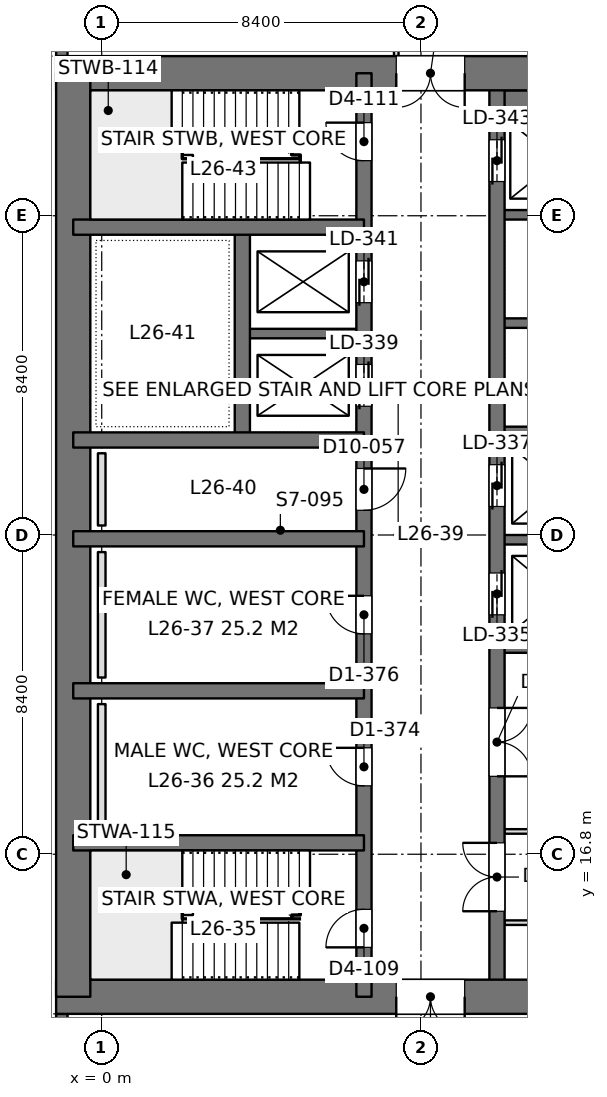
"""IFC4 building model, lengths in metres.
Left out: names, types, materials, properties, quantities, classifications, styles, units other than length and angle.
Written with IfcOpenShell. Run it as: python <this file> out.ifc"""

import sys

from ifc_helpers import new_model, si_unit, direction, frame, frame_2d, origin, place, context, subcontext, project, spatial, rectangle, extrude, element, fill, save


model = new_model("IFC4")
c1 = context("Model", 3, precision=1e-05, world=origin(), true_north=direction((0.0, 1.0)))
c2 = subcontext(c1, "Body", "Model", "MODEL_VIEW")
j1 = project(units=[si_unit("LENGTHUNIT", "METRE"), si_unit("PLANEANGLEUNIT", "RADIAN")], contexts=[c1])
p1 = place(None, origin())
s1 = spatial("IfcSite", under=j1, at=p1, CompositionType="ELEMENT")
p2 = place(p1, origin())
s2 = spatial("IfcBuilding", under=s1, at=p2, CompositionType="ELEMENT")
p3 = place(p2, frame((0.0, 0.0, 117.6)))
s3 = spatial("IfcBuildingStorey", under=s2, at=p3, CompositionType="ELEMENT", Elevation=117.6)
p4 = place(p3, frame((-1.2, 13.05, 0.0), z_axis=(0.0, 0.0, 1.0), x_axis=(1.0, 0.0, 0.0)))
e1 = element("IfcWall", 1, at=p4, inside=s3, PredefinedType="SHEAR", context=c2, shape_type="SweptSolid", body=[
    extrude(rectangle(XDim=18.0, YDim=0.9, at=frame_2d((9.0, 0.0))), origin(), (0.0, 0.0, 1.0), 4.2),
])
p5 = place(p4, frame((8.95, 0.0, 0.0)))
e2 = element("IfcOpeningElement", 2, at=p5, cuts=e1, PredefinedType="OPENING", context=c2, shape_type="SweptSolid", body=[
    extrude(rectangle(XDim=1.8, YDim=2.4, at=frame_2d((0.9, 1.2))), frame((0.0, 0.46, 0.0), z_axis=(0.0, -1.0, 0.0), x_axis=(1.0, 0.0, 0.0)), (0.0, 0.0, 1.0), 0.92),
])
p6 = place(p3, frame((-1.2, 37.35, 0.0), z_axis=(0.0, 0.0, 1.0), x_axis=(1.0, 0.0, 0.0)))
e3 = element("IfcWall", 3, at=p6, inside=s3, PredefinedType="SHEAR", context=c2, shape_type="SweptSolid", body=[
    extrude(rectangle(XDim=18.0, YDim=0.9, at=frame_2d((9.0, 0.0))), origin(), (0.0, 0.0, 1.0), 4.2),
])
p7 = place(p6, frame((8.95, 0.0, 0.0)))
e4 = element("IfcOpeningElement", 4, at=p7, cuts=e3, PredefinedType="OPENING", context=c2, shape_type="SweptSolid", body=[
    extrude(rectangle(XDim=1.8, YDim=2.4, at=frame_2d((0.9, 1.2))), frame((0.0, 0.46, 0.0), z_axis=(0.0, -1.0, 0.0), x_axis=(1.0, 0.0, 0.0)), (0.0, 0.0, 1.0), 0.92),
])
p8 = place(p3, frame((-0.75, 13.05, 0.0), z_axis=(0.0, 0.0, 1.0), x_axis=(0.0, 1.0, 0.0)))
e5 = element("IfcWall", 5, at=p8, inside=s3, PredefinedType="SHEAR", context=c2, shape_type="SweptSolid", body=[
    extrude(rectangle(XDim=24.3, YDim=0.9, at=frame_2d((12.15, 0.0))), origin(), (0.0, 0.0, 1.0), 4.2),
])
p9 = place(p3, frame((6.9, 13.05, 0.0), z_axis=(0.0, 0.0, 1.0), x_axis=(0.0, 1.0, 0.0)))
e6 = element("IfcWall", 6, at=p9, inside=s3, PredefinedType="SHEAR", context=c2, shape_type="SweptSolid", body=[
    extrude(rectangle(XDim=24.3, YDim=0.4, at=frame_2d((12.15, 0.0))), origin(), (0.0, 0.0, 1.0), 4.2),
])
p10 = place(p9, frame((1.3, 0.0, 0.0)))
e7 = element("IfcOpeningElement", 7, at=p10, cuts=e6, PredefinedType="OPENING", context=c2, shape_type="SweptSolid", body=[
    extrude(rectangle(XDim=1.0, YDim=2.2, at=frame_2d((0.5, 1.1))), frame((0.0, 0.21, 0.0), z_axis=(0.0, -1.0, 0.0), x_axis=(1.0, 0.0, 0.0)), (0.0, 0.0, 1.0), 0.42),
])
p11 = place(p9, frame((22.0, 0.0, 0.0)))
e8 = element("IfcOpeningElement", 8, at=p11, cuts=e6, PredefinedType="OPENING", context=c2, shape_type="SweptSolid", body=[
    extrude(rectangle(XDim=1.0, YDim=2.2, at=frame_2d((0.5, 1.1))), frame((0.0, 0.21, 0.0), z_axis=(0.0, -1.0, 0.0), x_axis=(1.0, 0.0, 0.0)), (0.0, 0.0, 1.0), 0.42),
])
p12 = place(p9, frame((5.55, 0.0, 0.0)))
e9 = element("IfcOpeningElement", 9, at=p12, cuts=e6, PredefinedType="OPENING", context=c2, shape_type="SweptSolid", body=[
    extrude(rectangle(XDim=1.0, YDim=2.2, at=frame_2d((0.5, 1.1))), frame((0.0, 0.21, 0.0), z_axis=(0.0, -1.0, 0.0), x_axis=(1.0, 0.0, 0.0)), (0.0, 0.0, 1.0), 0.42),
])
p13 = place(p9, frame((9.55, 0.0, 0.0)))
e10 = element("IfcOpeningElement", 10, at=p13, cuts=e6, PredefinedType="OPENING", context=c2, shape_type="SweptSolid", body=[
    extrude(rectangle(XDim=1.0, YDim=2.2, at=frame_2d((0.5, 1.1))), frame((0.0, 0.21, 0.0), z_axis=(0.0, -1.0, 0.0), x_axis=(1.0, 0.0, 0.0)), (0.0, 0.0, 1.0), 0.42),
])
p14 = place(p9, frame((12.8, 0.0, 0.0)))
e11 = element("IfcOpeningElement", 11, at=p14, cuts=e6, PredefinedType="OPENING", context=c2, shape_type="SweptSolid", body=[
    extrude(rectangle(XDim=1.1, YDim=2.2, at=frame_2d((0.55, 1.1))), frame((0.0, 0.21, 0.0), z_axis=(0.0, -1.0, 0.0), x_axis=(1.0, 0.0, 0.0)), (0.0, 0.0, 1.0), 0.42),
])
p15 = place(p9, frame((15.538, 0.0, 0.0)))
e12 = element("IfcOpeningElement", 12, at=p15, cuts=e6, PredefinedType="OPENING", context=c2, shape_type="SweptSolid", body=[
    extrude(rectangle(XDim=1.1, YDim=2.2, at=frame_2d((0.55, 1.1))), frame((0.0, 0.21, 0.0), z_axis=(0.0, -1.0, 0.0), x_axis=(1.0, 0.0, 0.0)), (0.0, 0.0, 1.0), 0.42),
])
p16 = place(p9, frame((18.262, 0.0, 0.0)))
e13 = element("IfcOpeningElement", 13, at=p16, cuts=e6, PredefinedType="OPENING", context=c2, shape_type="SweptSolid", body=[
    extrude(rectangle(XDim=1.1, YDim=2.2, at=frame_2d((0.55, 1.1))), frame((0.0, 0.21, 0.0), z_axis=(0.0, -1.0, 0.0), x_axis=(1.0, 0.0, 0.0)), (0.0, 0.0, 1.0), 0.42),
])
p17 = place(p3, frame((10.4, 13.05, 0.0), z_axis=(0.0, 0.0, 1.0), x_axis=(0.0, 1.0, 0.0)))
e14 = element("IfcWall", 14, at=p17, inside=s3, PredefinedType="SHEAR", context=c2, shape_type="SweptSolid", body=[
    extrude(rectangle(XDim=24.3, YDim=0.4, at=frame_2d((12.15, 0.0))), origin(), (0.0, 0.0, 1.0), 4.2),
])
p18 = place(p17, frame((10.05, 0.0, 0.0)))
e15 = element("IfcOpeningElement", 15, at=p18, cuts=e14, PredefinedType="OPENING", context=c2, shape_type="SweptSolid", body=[
    extrude(rectangle(XDim=1.1, YDim=2.2, at=frame_2d((0.55, 1.1))), frame((0.0, 0.21, 0.0), z_axis=(0.0, -1.0, 0.0), x_axis=(1.0, 0.0, 0.0)), (0.0, 0.0, 1.0), 0.42),
])
p19 = place(p17, frame((12.9, 0.0, 0.0)))
e16 = element("IfcOpeningElement", 16, at=p19, cuts=e14, PredefinedType="OPENING", context=c2, shape_type="SweptSolid", body=[
    extrude(rectangle(XDim=1.1, YDim=2.2, at=frame_2d((0.55, 1.1))), frame((0.0, 0.21, 0.0), z_axis=(0.0, -1.0, 0.0), x_axis=(1.0, 0.0, 0.0)), (0.0, 0.0, 1.0), 0.42),
])
p20 = place(p17, frame((21.45, 0.0, 0.0)))
e17 = element("IfcOpeningElement", 17, at=p20, cuts=e14, PredefinedType="OPENING", context=c2, shape_type="SweptSolid", body=[
    extrude(rectangle(XDim=1.1, YDim=2.2, at=frame_2d((0.55, 1.1))), frame((0.0, 0.21, 0.0), z_axis=(0.0, -1.0, 0.0), x_axis=(1.0, 0.0, 0.0)), (0.0, 0.0, 1.0), 0.42),
])
p21 = place(p17, frame((2.25, 0.0, 0.0)))
e18 = element("IfcOpeningElement", 18, at=p21, cuts=e14, PredefinedType="OPENING", context=c2, shape_type="SweptSolid", body=[
    extrude(rectangle(XDim=1.8, YDim=2.4, at=frame_2d((0.9, 1.2))), frame((0.0, 0.21, 0.0), z_axis=(0.0, -1.0, 0.0), x_axis=(1.0, 0.0, 0.0)), (0.0, 0.0, 1.0), 0.42),
])
p22 = place(p17, frame((5.8, 0.0, 0.0)))
e19 = element("IfcOpeningElement", 19, at=p22, cuts=e14, PredefinedType="OPENING", context=c2, shape_type="SweptSolid", body=[
    extrude(rectangle(XDim=1.8, YDim=2.4, at=frame_2d((0.9, 1.2))), frame((0.0, 0.21, 0.0), z_axis=(0.0, -1.0, 0.0), x_axis=(1.0, 0.0, 0.0)), (0.0, 0.0, 1.0), 0.42),
])
for number, where, z_axis, x_axis in (
    (20, (-0.75, 17.1, 0.0), (0.0, 0.0, 1.0), (1.0, 0.0, 0.0)),
    (21, (-0.75, 21.1, 0.0), (0.0, 0.0, 1.0), (1.0, 0.0, 0.0)),
    (22, (-0.75, 25.1, 0.0), (0.0, 0.0, 1.0), (1.0, 0.0, 0.0)),
    (23, (-0.75, 27.7, 0.0), (0.0, 0.0, 1.0), (1.0, 0.0, 0.0)),
    (24, (-0.75, 33.3, 0.0), (0.0, 0.0, 1.0), (1.0, 0.0, 0.0)),
):
    element("IfcWall", number, at=place(p3, frame(where, z_axis=z_axis, x_axis=x_axis)), inside=s3, PredefinedType="SHEAR", context=c2, shape_type="SweptSolid", body=[
        extrude(rectangle(XDim=7.65, YDim=0.4, at=frame_2d((3.825, 0.0))), origin(), (0.0, 0.0, 1.0), 4.2),
    ])
p23 = place(p3, frame((3.7, 27.7, 0.0), z_axis=(0.0, 0.0, 1.0), x_axis=(0.0, 1.0, 0.0)))
e25 = element("IfcWall", 25, at=p23, inside=s3, PredefinedType="SHEAR", context=c2, shape_type="SweptSolid", body=[
    extrude(rectangle(XDim=5.6, YDim=0.4, at=frame_2d((2.8, 0.0))), origin(), (0.0, 0.0, 1.0), 4.2),
])
p24 = place(p3, frame((3.7, 30.5, 0.0), z_axis=(0.0, 0.0, 1.0), x_axis=(1.0, 0.0, 0.0)))
e26 = element("IfcWall", 26, at=p24, inside=s3, PredefinedType="SHEAR", context=c2, shape_type="SweptSolid", body=[
    extrude(rectangle(XDim=3.2, YDim=0.25, at=frame_2d((1.6, 0.0))), origin(), (0.0, 0.0, 1.0), 4.2),
])
p25 = place(p3, frame((10.4, 22.225, 0.0), z_axis=(0.0, 0.0, 1.0), x_axis=(1.0, 0.0, 0.0)))
e27 = element("IfcWall", 27, at=p25, inside=s3, PredefinedType="SHEAR", context=c2, shape_type="SweptSolid", body=[
    extrude(rectangle(XDim=5.95, YDim=0.25, at=frame_2d((2.975, 0.0))), origin(), (0.0, 0.0, 1.0), 4.2),
])
for number, where, z_axis, x_axis in (
    (28, (10.4, 25.075, 0.0), (0.0, 0.0, 1.0), (1.0, 0.0, 0.0)),
    (29, (10.4, 27.925, 0.0), (0.0, 0.0, 1.0), (1.0, 0.0, 0.0)),
    (30, (10.4, 30.775, 0.0), (0.0, 0.0, 1.0), (1.0, 0.0, 0.0)),
    (31, (10.4, 33.625, 0.0), (0.0, 0.0, 1.0), (1.0, 0.0, 0.0)),
):
    element("IfcWall", number, at=place(p3, frame(where, z_axis=z_axis, x_axis=x_axis)), inside=s3, PredefinedType="SHEAR", context=c2, shape_type="SweptSolid", body=[
        extrude(rectangle(XDim=3.2, YDim=0.25, at=frame_2d((1.6, 0.0))), origin(), (0.0, 0.0, 1.0), 4.2),
    ])
p26 = place(p3, frame((10.4, 36.625, 0.0), z_axis=(0.0, 0.0, 1.0), x_axis=(1.0, 0.0, 0.0)))
e32 = element("IfcWall", 32, at=p26, inside=s3, PredefinedType="SHEAR", context=c2, shape_type="SweptSolid", body=[
    extrude(rectangle(XDim=3.2, YDim=0.55, at=frame_2d((1.6, 0.0))), origin(), (0.0, 0.0, 1.0), 4.2),
])
p27 = place(p3, frame((-1.05, 8.4, 0.0), z_axis=(0.0, 0.0, 1.0), x_axis=(0.0, 1.0, 0.0)))
e33 = element("IfcWall", 33, at=p27, inside=s3, PredefinedType="SOLIDWALL", context=c2, shape_type="SweptSolid", body=[
    extrude(rectangle(XDim=4.2, YDim=0.3, at=frame_2d((2.1, 0.0))), origin(), (0.0, 0.0, 1.0), 4.05),
])
p28 = place(p27, frame((0.9, 0.0, 0.9)))
e34 = element("IfcOpeningElement", 34, at=p28, cuts=e33, PredefinedType="OPENING", context=c2, shape_type="SweptSolid", body=[
    extrude(rectangle(XDim=2.4, YDim=1.9, at=frame_2d((1.2, 0.95))), frame((0.0, 0.16, 0.0), z_axis=(0.0, -1.0, 0.0), x_axis=(1.0, 0.0, 0.0)), (0.0, 0.0, 1.0), 0.32),
])
p29 = place(p3, frame((-1.05, 37.8, 0.0), z_axis=(0.0, 0.0, 1.0), x_axis=(0.0, 1.0, 0.0)))
e35 = element("IfcWall", 35, at=p29, inside=s3, PredefinedType="SOLIDWALL", context=c2, shape_type="SweptSolid", body=[
    extrude(rectangle(XDim=4.2, YDim=0.3, at=frame_2d((2.1, 0.0))), origin(), (0.0, 0.0, 1.0), 4.05),
])
p30 = place(p29, frame((0.9, 0.0, 0.9)))
e36 = element("IfcOpeningElement", 36, at=p30, cuts=e35, PredefinedType="OPENING", context=c2, shape_type="SweptSolid", body=[
    extrude(rectangle(XDim=2.4, YDim=1.9, at=frame_2d((1.2, 0.95))), frame((0.0, 0.16, 0.0), z_axis=(0.0, -1.0, 0.0), x_axis=(1.0, 0.0, 0.0)), (0.0, 0.0, 1.0), 0.32),
])
p31 = place(p3, frame((10.598, 17.4, 0.0), z_axis=(0.0, 0.0, 1.0), x_axis=(1.0, 0.0, 0.0)))
e37 = element("IfcWall", 37, at=p31, inside=s3, PredefinedType="PARTITIONING", context=c2, shape_type="SweptSolid", body=[
    extrude(rectangle(XDim=5.904, YDim=0.12, at=frame_2d((2.952, 0.0))), origin(), (0.0, 0.0, 1.0), 3.55),
])
p32 = place(p31, frame((4.152, 0.0, 0.0)))
e38 = element("IfcOpeningElement", 38, at=p32, cuts=e37, PredefinedType="OPENING", context=c2, shape_type="SweptSolid", body=[
    extrude(rectangle(XDim=1.0, YDim=2.4, at=frame_2d((0.5, 1.2))), frame((0.0, 0.07, 0.0), z_axis=(0.0, -1.0, 0.0), x_axis=(1.0, 0.0, 0.0)), (0.0, 0.0, 1.0), 0.14),
])
p33 = place(p3, frame((10.598, 15.0, 0.0), z_axis=(0.0, 0.0, 1.0), x_axis=(1.0, 0.0, 0.0)))
e39 = element("IfcWall", 39, at=p33, inside=s3, PredefinedType="PARTITIONING", context=c2, shape_type="SweptSolid", body=[
    extrude(rectangle(XDim=6.204, YDim=0.12, at=frame_2d((3.102, 0.0))), origin(), (0.0, 0.0, 1.0), 3.55),
])
p34 = place(p3, frame((7.75, 37.8, 0.0), z_axis=(0.0, 0.0, 1.0), x_axis=(0.0, 1.0, 0.0)))
e40 = element("IfcWall", 40, at=p34, inside=s3, PredefinedType="PARTITIONING", context=c2, shape_type="SweptSolid", body=[
    extrude(rectangle(XDim=2.0, YDim=0.12, at=frame_2d((1.0, 0.0))), origin(), (0.0, 0.0, 1.0), 4.05),
])
for number, where, z_axis, x_axis in (
    (41, (0.0, 17.45, 0.0), (0.0, 0.0, 1.0), (0.0, 1.0, 0.0)),
    (42, (0.0, 21.45, 0.0), (0.0, 0.0, 1.0), (0.0, 1.0, 0.0)),
):
    element("IfcWall", number, at=place(p3, frame(where, z_axis=z_axis, x_axis=x_axis)), inside=s3, PredefinedType="PLUMBINGWALL", context=c2, shape_type="SweptSolid", body=[
        extrude(rectangle(XDim=3.3, YDim=0.2, at=frame_2d((1.65, 0.0))), origin(), (0.0, 0.0, 1.0), 1.2),
    ])
p35 = place(p3, frame((0.0, 25.45, 0.0), z_axis=(0.0, 0.0, 1.0), x_axis=(0.0, 1.0, 0.0)))
e43 = element("IfcWall", 43, at=p35, inside=s3, PredefinedType="PLUMBINGWALL", context=c2, shape_type="SweptSolid", body=[
    extrude(rectangle(XDim=1.9, YDim=0.2, at=frame_2d((0.95, 0.0))), origin(), (0.0, 0.0, 1.0), 1.2),
])
p36 = place(p5, frame((1.8, 0.0, 0.0), z_axis=(0.0, 0.0, 1.0), x_axis=(-1.0, 0.0, 0.0)))
e44 = element("IfcDoor", 44, at=p36, inside=s3, OperationType="DOUBLE_DOOR_SINGLE_SWING", PredefinedType="DOOR", context=c2, shape_type="SweptSolid", body=[
    extrude(rectangle(XDim=1.8, YDim=2.4, at=frame_2d((0.9, 1.2))), frame((0.0, 0.025, 0.0), z_axis=(0.0, -1.0, 0.0), x_axis=(1.0, 0.0, 0.0)), (0.0, 0.0, 1.0), 0.05),
])
fill(e2, e44)
p37 = place(p7, frame((1.8, 0.0, 0.0), z_axis=(0.0, 0.0, 1.0), x_axis=(-1.0, 0.0, 0.0)))
e45 = element("IfcDoor", 45, at=p37, inside=s3, OperationType="DOUBLE_DOOR_SINGLE_SWING", PredefinedType="DOOR", context=c2, shape_type="SweptSolid", body=[
    extrude(rectangle(XDim=1.8, YDim=2.4, at=frame_2d((0.9, 1.2))), frame((0.0, 0.025, 0.0), z_axis=(0.0, -1.0, 0.0), x_axis=(1.0, 0.0, 0.0)), (0.0, 0.0, 1.0), 0.05),
])
fill(e4, e45)
p38 = place(p10, origin())
e46 = element("IfcDoor", 46, at=p38, inside=s3, OperationType="SINGLE_SWING_LEFT", PredefinedType="DOOR", context=c2, shape_type="SweptSolid", body=[
    extrude(rectangle(XDim=1.0, YDim=2.2, at=frame_2d((0.5, 1.1))), frame((0.0, 0.025, 0.0), z_axis=(0.0, -1.0, 0.0), x_axis=(1.0, 0.0, 0.0)), (0.0, 0.0, 1.0), 0.05),
])
fill(e7, e46)
p39 = place(p11, origin())
e47 = element("IfcDoor", 47, at=p39, inside=s3, OperationType="SINGLE_SWING_RIGHT", PredefinedType="DOOR", context=c2, shape_type="SweptSolid", body=[
    extrude(rectangle(XDim=1.0, YDim=2.2, at=frame_2d((0.5, 1.1))), frame((0.0, 0.025, 0.0), z_axis=(0.0, -1.0, 0.0), x_axis=(1.0, 0.0, 0.0)), (0.0, 0.0, 1.0), 0.05),
])
fill(e8, e47)
p40 = place(p12, origin())
e48 = element("IfcDoor", 48, at=p40, inside=s3, OperationType="SINGLE_SWING_RIGHT", PredefinedType="DOOR", context=c2, shape_type="SweptSolid", body=[
    extrude(rectangle(XDim=1.0, YDim=2.2, at=frame_2d((0.5, 1.1))), frame((0.0, 0.025, 0.0), z_axis=(0.0, -1.0, 0.0), x_axis=(1.0, 0.0, 0.0)), (0.0, 0.0, 1.0), 0.05),
])
fill(e9, e48)
p41 = place(p13, origin())
e49 = element("IfcDoor", 49, at=p41, inside=s3, OperationType="SINGLE_SWING_RIGHT", PredefinedType="DOOR", context=c2, shape_type="SweptSolid", body=[
    extrude(rectangle(XDim=1.0, YDim=2.2, at=frame_2d((0.5, 1.1))), frame((0.0, 0.025, 0.0), z_axis=(0.0, -1.0, 0.0), x_axis=(1.0, 0.0, 0.0)), (0.0, 0.0, 1.0), 0.05),
])
fill(e10, e49)
p42 = place(p14, frame((1.1, 0.0, 0.0), z_axis=(0.0, 0.0, 1.0), x_axis=(-1.0, 0.0, 0.0)))
e50 = element("IfcDoor", 50, at=p42, inside=s3, OperationType="SINGLE_SWING_LEFT", PredefinedType="DOOR", context=c2, shape_type="SweptSolid", body=[
    extrude(rectangle(XDim=1.1, YDim=2.2, at=frame_2d((0.55, 1.1))), frame((0.0, 0.025, 0.0), z_axis=(0.0, -1.0, 0.0), x_axis=(1.0, 0.0, 0.0)), (0.0, 0.0, 1.0), 0.05),
])
fill(e11, e50)
p43 = place(p18, origin())
e51 = element("IfcDoor", 51, at=p43, inside=s3, OperationType="DOUBLE_DOOR_SLIDING", PredefinedType="DOOR", context=c2, shape_type="SweptSolid", body=[
    extrude(rectangle(XDim=1.1, YDim=2.2, at=frame_2d((0.55, 1.1))), frame((0.0, 0.025, 0.0), z_axis=(0.0, -1.0, 0.0), x_axis=(1.0, 0.0, 0.0)), (0.0, 0.0, 1.0), 0.05),
])
fill(e15, e51)
p44 = place(p19, origin())
e52 = element("IfcDoor", 52, at=p44, inside=s3, OperationType="DOUBLE_DOOR_SLIDING", PredefinedType="DOOR", context=c2, shape_type="SweptSolid", body=[
    extrude(rectangle(XDim=1.1, YDim=2.2, at=frame_2d((0.55, 1.1))), frame((0.0, 0.025, 0.0), z_axis=(0.0, -1.0, 0.0), x_axis=(1.0, 0.0, 0.0)), (0.0, 0.0, 1.0), 0.05),
])
fill(e16, e52)
p45 = place(p20, origin())
e53 = element("IfcDoor", 53, at=p45, inside=s3, OperationType="DOUBLE_DOOR_SLIDING", PredefinedType="DOOR", context=c2, shape_type="SweptSolid", body=[
    extrude(rectangle(XDim=1.1, YDim=2.2, at=frame_2d((0.55, 1.1))), frame((0.0, 0.025, 0.0), z_axis=(0.0, -1.0, 0.0), x_axis=(1.0, 0.0, 0.0)), (0.0, 0.0, 1.0), 0.05),
])
fill(e17, e53)
p46 = place(p15, origin())
e54 = element("IfcDoor", 54, at=p46, inside=s3, OperationType="DOUBLE_DOOR_SLIDING", PredefinedType="DOOR", context=c2, shape_type="SweptSolid", body=[
    extrude(rectangle(XDim=1.1, YDim=2.2, at=frame_2d((0.55, 1.1))), frame((0.0, 0.025, 0.0), z_axis=(0.0, -1.0, 0.0), x_axis=(1.0, 0.0, 0.0)), (0.0, 0.0, 1.0), 0.05),
])
fill(e12, e54)
p47 = place(p16, origin())
e55 = element("IfcDoor", 55, at=p47, inside=s3, OperationType="DOUBLE_DOOR_SLIDING", PredefinedType="DOOR", context=c2, shape_type="SweptSolid", body=[
    extrude(rectangle(XDim=1.1, YDim=2.2, at=frame_2d((0.55, 1.1))), frame((0.0, 0.025, 0.0), z_axis=(0.0, -1.0, 0.0), x_axis=(1.0, 0.0, 0.0)), (0.0, 0.0, 1.0), 0.05),
])
fill(e13, e55)
p48 = place(p21, origin())
e56 = element("IfcDoor", 56, at=p48, inside=s3, OperationType="DOUBLE_DOOR_SINGLE_SWING", PredefinedType="DOOR", context=c2, shape_type="SweptSolid", body=[
    extrude(rectangle(XDim=1.8, YDim=2.4, at=frame_2d((0.9, 1.2))), frame((0.0, 0.025, 0.0), z_axis=(0.0, -1.0, 0.0), x_axis=(1.0, 0.0, 0.0)), (0.0, 0.0, 1.0), 0.05),
])
fill(e18, e56)
p49 = place(p22, frame((1.8, 0.0, 0.0), z_axis=(0.0, 0.0, 1.0), x_axis=(-1.0, 0.0, 0.0)))
e57 = element("IfcDoor", 57, at=p49, inside=s3, OperationType="DOUBLE_DOOR_SINGLE_SWING", PredefinedType="DOOR", context=c2, shape_type="SweptSolid", body=[
    extrude(rectangle(XDim=1.8, YDim=2.4, at=frame_2d((0.9, 1.2))), frame((0.0, 0.025, 0.0), z_axis=(0.0, -1.0, 0.0), x_axis=(1.0, 0.0, 0.0)), (0.0, 0.0, 1.0), 0.05),
])
fill(e19, e57)
save(model, sys.argv[1])
